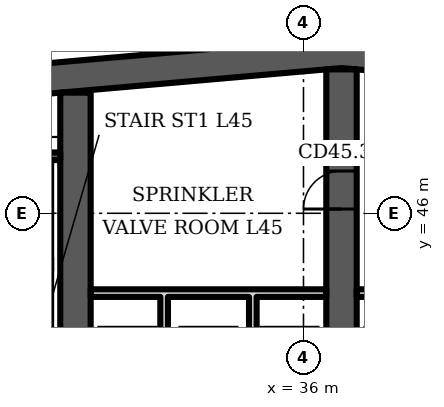
"""IFC4 building model, lengths in metres.
Left out: names, types, materials, properties, quantities, classifications, styles, units other than length and angle.
Written with IfcOpenShell. Run it as: python <this file> out.ifc"""

import sys

from ifc_helpers import new_model, si_unit, direction, frame, frame_2d, origin, place, context, subcontext, project, spatial, polyline, rectangle, outline, extrude, element, fill, save


model = new_model("IFC4")
c1 = context("Model", 3, precision=1e-05, world=origin(), true_north=direction((0.0, 1.0)))
c2 = subcontext(c1, "Body", "Model", "MODEL_VIEW")
j1 = project(units=[si_unit("LENGTHUNIT", "METRE"), si_unit("PLANEANGLEUNIT", "RADIAN")], contexts=[c1])
p1 = place(None, origin())
s1 = spatial("IfcSite", under=j1, at=p1, CompositionType="ELEMENT")
p2 = place(p1, origin())
s2 = spatial("IfcBuilding", under=s1, at=p2, CompositionType="ELEMENT")
p3 = place(p2, frame((0.0, 0.0, 184.3)))
s3 = spatial("IfcBuildingStorey", under=s2, at=p3, CompositionType="ELEMENT", Elevation=184.3)
p4 = place(p3, frame((0.0, 0.0, -0.0)))
e1 = element("IfcWall", 1, at=p4, inside=s3, PredefinedType="SHEAR", context=c2, shape_type="SweptSolid", body=[
    extrude(outline(polyline([(16.0, 47.984), (37.0, 49.822), (58.0, 47.984), (58.0, 48.787), (37.0, 50.625), (16.0, 48.787), (16.0, 47.984)])), origin(), (0.0, 0.0, 1.0), 3.6),
])
p5 = place(p3, frame((30.0, 34.8, 0.0), z_axis=(0.0, 0.0, 1.0), x_axis=(0.0, 1.0, 0.0)))
e2 = element("IfcWall", 2, at=p5, inside=s3, PredefinedType="SHEAR", context=c2, shape_type="SweptSolid", body=[
    extrude(rectangle(XDim=14.374, YDim=0.8, at=frame_2d((7.187, 0.0))), origin(), (0.0, 0.0, 1.0), 3.6),
])
p6 = place(p5, frame((3.6, 0.0, 0.0)))
e3 = element("IfcOpeningElement", 3, at=p6, cuts=e2, PredefinedType="OPENING", context=c2, shape_type="SweptSolid", body=[
    extrude(rectangle(XDim=1.1, YDim=2.1, at=frame_2d((0.55, 1.05))), frame((0.0, 0.41, 0.0), z_axis=(0.0, -1.0, 0.0), x_axis=(1.0, 0.0, 0.0)), (0.0, 0.0, 1.0), 0.82),
])
p7 = place(p3, frame((37.0, 34.8, 0.0), z_axis=(0.0, 0.0, 1.0), x_axis=(0.0, 1.0, 0.0)))
e4 = element("IfcWall", 4, at=p7, inside=s3, PredefinedType="SHEAR", context=c2, shape_type="SweptSolid", body=[
    extrude(rectangle(XDim=14.987, YDim=0.8, at=frame_2d((7.493, 0.0))), origin(), (0.0, 0.0, 1.0), 3.6),
])
p8 = place(p7, frame((11.312, 0.0, 0.0)))
e5 = element("IfcOpeningElement", 5, at=p8, cuts=e4, PredefinedType="OPENING", context=c2, shape_type="SweptSolid", body=[
    extrude(rectangle(XDim=1.0, YDim=2.1, at=frame_2d((0.5, 1.05))), frame((0.0, 0.41, 0.0), z_axis=(0.0, -1.0, 0.0), x_axis=(1.0, 0.0, 0.0)), (0.0, 0.0, 1.0), 0.82),
])
p9 = place(p7, frame((3.6, 0.0, 0.0)))
e6 = element("IfcOpeningElement", 6, at=p9, cuts=e4, PredefinedType="OPENING", context=c2, shape_type="SweptSolid", body=[
    extrude(rectangle(XDim=1.1, YDim=2.1, at=frame_2d((0.55, 1.05))), frame((0.0, 0.41, 0.0), z_axis=(0.0, -1.0, 0.0), x_axis=(1.0, 0.0, 0.0)), (0.0, 0.0, 1.0), 0.82),
])
p10 = place(p3, frame((25.75, 47.5, 0.0), z_axis=(0.0, 0.0, 1.0), x_axis=(1.0, 0.0, 0.0)))
e7 = element("IfcWall", 7, at=p10, inside=s3, PredefinedType="SHEAR", context=c2, shape_type="SweptSolid", body=[
    extrude(rectangle(XDim=3.85, YDim=0.2, at=frame_2d((1.925, 0.0))), origin(), (0.0, 0.0, 1.0), 3.2),
])
p11 = place(p3, frame((0.0, 0.0, -0.0)))
e8 = element("IfcWall", 8, at=p11, inside=s3, PredefinedType="PARTITIONING", context=c2, shape_type="SweptSolid", body=[
    extrude(outline(polyline([(32.433, 40.8), (32.233, 40.8), (32.233, 43.8), (30.4, 43.8), (30.4, 44.0), (36.6, 44.0), (36.6, 43.8), (34.767, 43.8), (34.767, 40.8), (34.567, 40.8), (34.567, 43.8), (32.433, 43.8), (32.433, 40.8)])), origin(), (0.0, 0.0, 1.0), 3.2),
])
p12 = place(p3, frame((0.0, 0.0, -0.0)))
e9 = element("IfcWall", 9, at=p12, inside=s3, PredefinedType="PARTITIONING", context=c2, shape_type="SweptSolid", body=[
    extrude(outline(polyline([(39.433, 40.8), (39.233, 40.8), (39.233, 43.8), (37.4, 43.8), (37.4, 44.0), (43.6, 44.0), (43.6, 43.8), (41.767, 43.8), (41.767, 40.8), (41.567, 40.8), (41.567, 43.8), (39.433, 43.8), (39.433, 40.8)])), origin(), (0.0, 0.0, 1.0), 3.2),
])
p13 = place(p8, origin())
e10 = element("IfcDoor", 10, at=p13, inside=s3, OperationType="SINGLE_SWING_LEFT", PredefinedType="DOOR", context=c2, shape_type="SweptSolid", body=[
    extrude(rectangle(XDim=1.0, YDim=2.1, at=frame_2d((0.5, 1.05))), frame((0.0, 0.4, 0.0), z_axis=(0.0, -1.0, 0.0), x_axis=(1.0, 0.0, 0.0)), (0.0, 0.0, 1.0), 0.8),
])
fill(e5, e10)
save(model, sys.argv[1])
